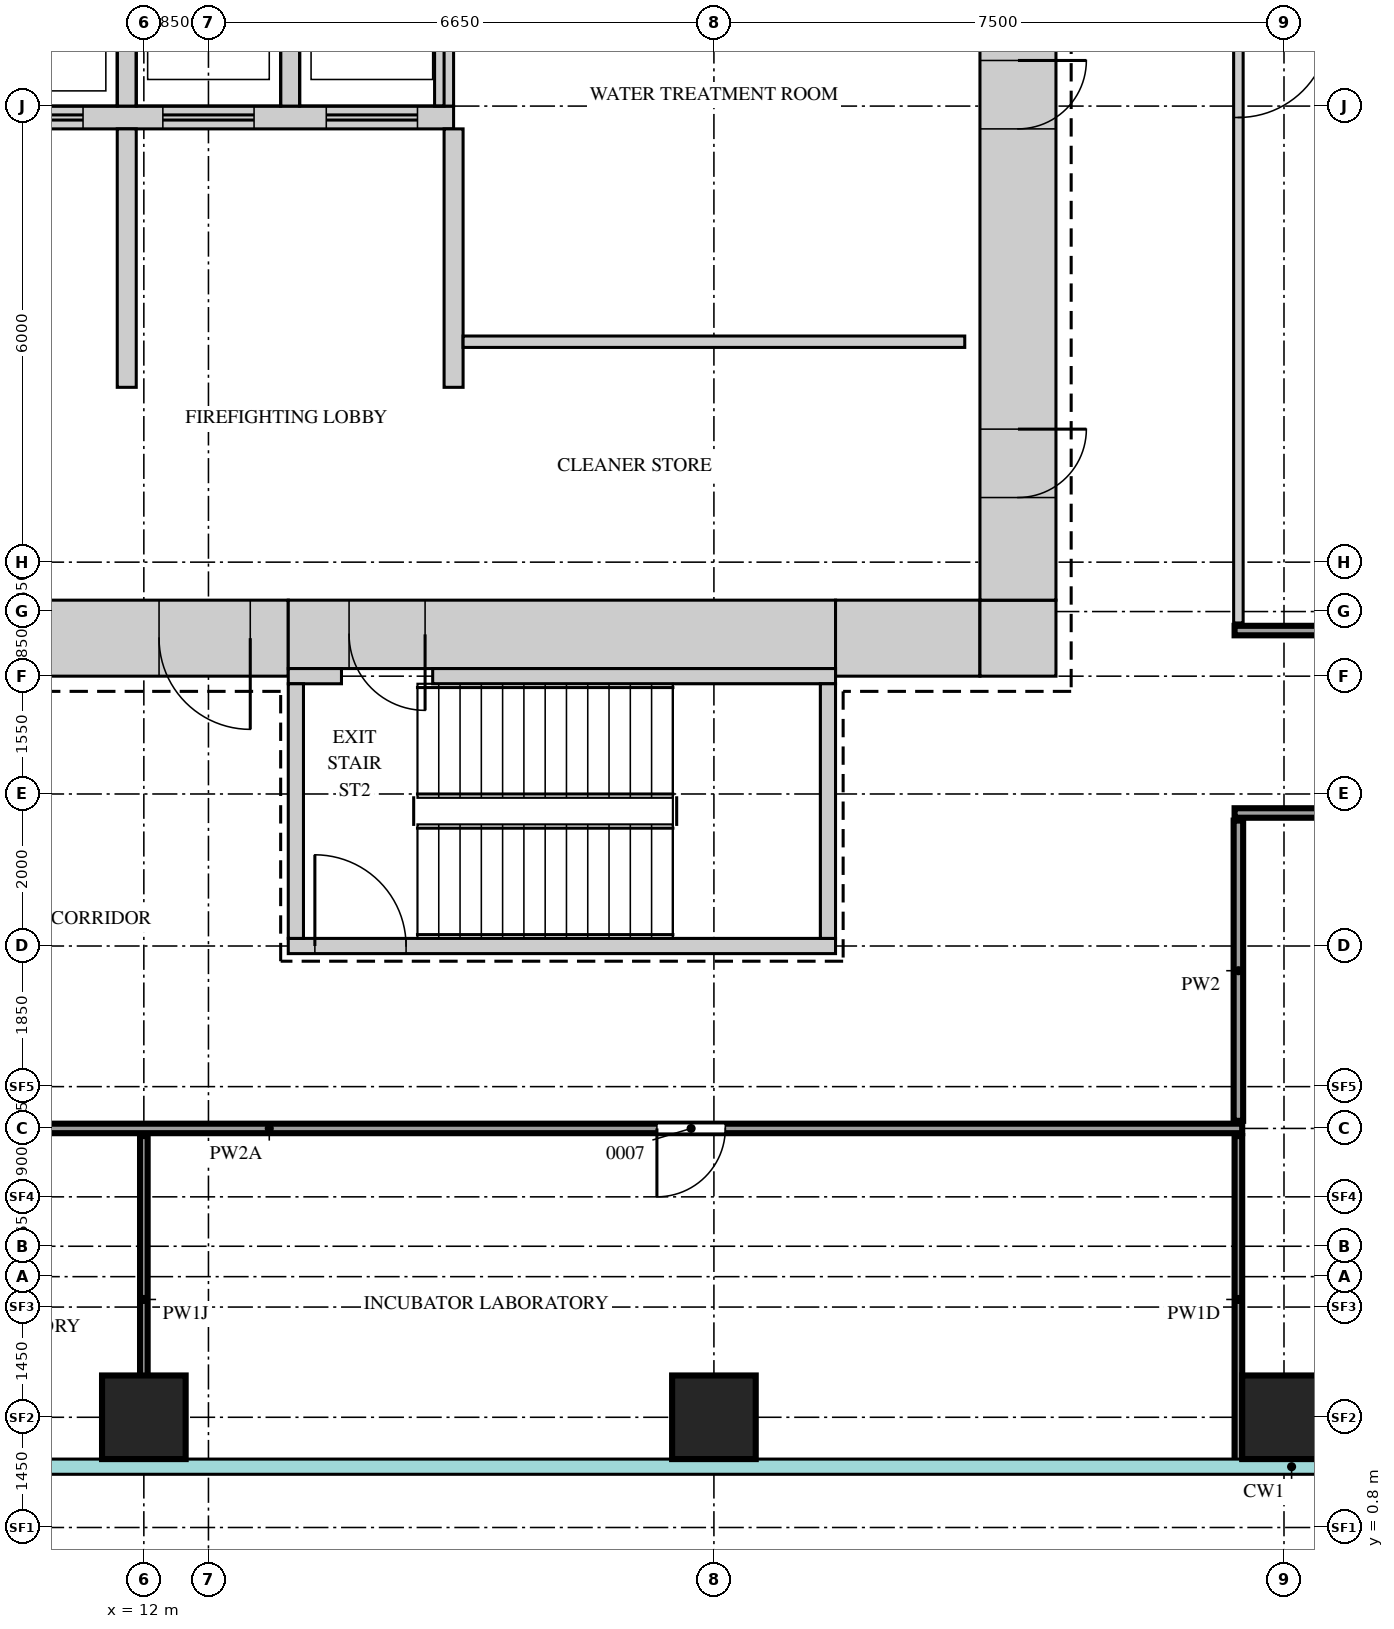
"""IFC4 building model, lengths in metres.
Left out: names, types, materials, properties, quantities, classifications, styles, units other than length and angle.
Written with IfcOpenShell. Run it as: python <this file> out.ifc"""

import sys

from ifc_helpers import new_model, si_unit, direction, frame, frame_2d, origin, origin_2d, place, context, subcontext, project, spatial, rectangle, extrude, source, transform, mapped, element, fill, save


model = new_model("IFC4")
c1 = context("Model", 3, precision=1e-05, world=origin(), true_north=direction((0.0, 1.0)))
c2 = subcontext(c1, "Body", "Model", "MODEL_VIEW")
j1 = project(units=[si_unit("LENGTHUNIT", "METRE"), si_unit("PLANEANGLEUNIT", "RADIAN")], contexts=[c1])
p1 = place(None, origin())
s1 = spatial("IfcSite", under=j1, at=p1, CompositionType="ELEMENT")
p2 = place(p1, origin())
s2 = spatial("IfcBuilding", under=s1, at=p2, CompositionType="ELEMENT")
p3 = place(p2, frame((0.0, 0.0, 149.9)))
s3 = spatial("IfcBuildingStorey", under=s2, at=p3, CompositionType="ELEMENT", Elevation=149.9)
m1 = source(origin(), c2, "Body", "SweptSolid", [
    extrude(rectangle(XDim=6.9, YDim=1.0, at=frame_2d((3.45, 0.0))), origin(), (0.0, 0.0, 1.0), 4.1),
])
p4 = place(p3, frame((7.0, 12.5, 0.0), z_axis=(0.0, 0.0, 1.0), x_axis=(1.0, 0.0, 0.0)))
e1 = element("IfcWall", 1, at=p4, inside=s3, PredefinedType="SHEAR", context=c2, shape_type="MappedRepresentation", body=[
    mapped(m1, transform((0.0, 0.0, 0.0))),
])
m2 = source(origin(), c2, "Body", "SweptSolid", [
    extrude(rectangle(XDim=1.2, YDim=2.1, at=frame_2d((0.6, 1.05))), frame((0.0, 0.51, 0.0), z_axis=(0.0, -1.0, 0.0), x_axis=(1.0, 0.0, 0.0)), (0.0, 0.0, 1.0), 1.02),
])
p5 = place(p4, frame((5.2, 0.0, 0.0)))
e2 = element("IfcOpeningElement", 2, at=p5, cuts=e1, PredefinedType="OPENING", context=c2, shape_type="MappedRepresentation", body=[
    mapped(m2, transform((0.0, 0.0, 0.0))),
])
p6 = place(p4, frame((1.85, 0.0, 0.0)))
e3 = element("IfcOpeningElement", 3, at=p6, cuts=e1, PredefinedType="OPENING", context=c2, shape_type="MappedRepresentation", body=[
    mapped(m2, transform((0.0, 0.0, 0.0))),
])
m3 = source(origin(), c2, "Body", "SweptSolid", [
    extrude(rectangle(XDim=7.2, YDim=0.9, at=frame_2d((3.6, 0.0))), origin(), (0.0, 0.0, 1.0), 4.1),
])
p7 = place(p3, frame((13.9, 12.55, 0.0), z_axis=(0.0, 0.0, 1.0), x_axis=(1.0, 0.0, 0.0)))
e4 = element("IfcWall", 4, at=p7, inside=s3, PredefinedType="SHEAR", context=c2, shape_type="MappedRepresentation", body=[
    mapped(m3, transform((0.0, 0.0, 0.0))),
])
m4 = source(origin(), c2, "Body", "SweptSolid", [
    extrude(rectangle(XDim=1.0, YDim=2.1, at=frame_2d((0.5, 1.05))), frame((0.0, 0.46, 0.0), z_axis=(0.0, -1.0, 0.0), x_axis=(1.0, 0.0, 0.0)), (0.0, 0.0, 1.0), 0.92),
])
p8 = place(p7, frame((0.8, 0.0, 0.0)))
e5 = element("IfcOpeningElement", 5, at=p8, cuts=e4, PredefinedType="OPENING", context=c2, shape_type="MappedRepresentation", body=[
    mapped(m4, transform((0.0, 0.0, 0.0))),
])
m5 = source(origin(), c2, "Body", "SweptSolid", [
    extrude(rectangle(XDim=1.9, YDim=1.0, at=frame_2d((0.95, 0.0))), origin(), (0.0, 0.0, 1.0), 4.1),
])
p9 = place(p3, frame((21.1, 12.5, 0.0), z_axis=(0.0, 0.0, 1.0), x_axis=(1.0, 0.0, 0.0)))
e6 = element("IfcWall", 6, at=p9, inside=s3, PredefinedType="SHEAR", context=c2, shape_type="MappedRepresentation", body=[
    mapped(m5, transform((0.0, 0.0, 0.0))),
])
m6 = source(origin(), c2, "Body", "SweptSolid", [
    extrude(rectangle(XDim=1.0, YDim=1.0, at=frame_2d((0.5, 0.0))), origin(), (0.0, 0.0, 1.0), 4.1),
])
p10 = place(p3, frame((23.0, 12.5, 0.0), z_axis=(0.0, 0.0, 1.0), x_axis=(1.0, 0.0, 0.0)))
e7 = element("IfcWall", 7, at=p10, inside=s3, PredefinedType="SHEAR", context=c2, shape_type="MappedRepresentation", body=[
    mapped(m6, transform((0.0, 0.0, 0.0))),
])
m7 = source(origin(), c2, "Body", "SweptSolid", [
    extrude(rectangle(XDim=28.0, YDim=1.0, at=frame_2d((14.0, 0.0))), origin(), (0.0, 0.0, 1.0), 4.1),
])
p11 = place(p3, frame((23.5, 13.0, 0.0), z_axis=(0.0, 0.0, 1.0), x_axis=(0.0, 1.0, 0.0)))
e8 = element("IfcWall", 8, at=p11, inside=s3, PredefinedType="SHEAR", context=c2, shape_type="MappedRepresentation", body=[
    mapped(m7, transform((0.0, 0.0, 0.0))),
])
m8 = source(origin(), c2, "Body", "SweptSolid", [
    extrude(rectangle(XDim=1.8, YDim=2.1, at=frame_2d((0.9, 1.05))), frame((0.0, 0.51, 0.0), z_axis=(0.0, -1.0, 0.0), x_axis=(1.0, 0.0, 0.0)), (0.0, 0.0, 1.0), 1.02),
])
p12 = place(p11, frame((22.6, 0.0, 0.0)))
e9 = element("IfcOpeningElement", 9, at=p12, cuts=e8, PredefinedType="OPENING", context=c2, shape_type="MappedRepresentation", body=[
    mapped(m8, transform((0.0, 0.0, 0.0))),
])
p13 = place(p11, frame((14.6, 0.0, 0.0)))
e10 = element("IfcOpeningElement", 10, at=p13, cuts=e8, PredefinedType="OPENING", context=c2, shape_type="MappedRepresentation", body=[
    mapped(m2, transform((0.0, 0.0, 0.0))),
])
m9 = source(origin(), c2, "Body", "SweptSolid", [
    extrude(rectangle(XDim=0.9, YDim=2.1, at=frame_2d((0.45, 1.05))), frame((0.0, 0.51, 0.0), z_axis=(0.0, -1.0, 0.0), x_axis=(1.0, 0.0, 0.0)), (0.0, 0.0, 1.0), 1.02),
])
p14 = place(p11, frame((1.35, 0.0, 0.0)))
e11 = element("IfcOpeningElement", 11, at=p14, cuts=e8, PredefinedType="OPENING", context=c2, shape_type="MappedRepresentation", body=[
    mapped(m9, transform((0.0, 0.0, 0.0))),
])
p15 = place(p11, frame((6.2, 0.0, 0.0)))
e12 = element("IfcOpeningElement", 12, at=p15, cuts=e8, PredefinedType="OPENING", context=c2, shape_type="MappedRepresentation", body=[
    mapped(m9, transform((0.0, 0.0, 0.0))),
])
m10 = source(origin(), c2, "Body", "SweptSolid", [
    extrude(rectangle(XDim=0.7, YDim=0.2, at=frame_2d((0.35, 0.0))), origin(), (0.0, 0.0, 1.0), 4.1),
])
p16 = place(p3, frame((13.9, 12.0, 0.0), z_axis=(0.0, 0.0, 1.0), x_axis=(1.0, 0.0, 0.0)))
e13 = element("IfcWall", 13, at=p16, inside=s3, PredefinedType="SHEAR", context=c2, shape_type="MappedRepresentation", body=[
    mapped(m10, transform((0.0, 0.0, 0.0))),
])
m11 = source(origin(), c2, "Body", "SweptSolid", [
    extrude(rectangle(XDim=5.3, YDim=0.2, at=frame_2d((2.65, 0.0))), origin(), (0.0, 0.0, 1.0), 4.1),
])
p17 = place(p3, frame((15.8, 12.0, 0.0), z_axis=(0.0, 0.0, 1.0), x_axis=(1.0, 0.0, 0.0)))
e14 = element("IfcWall", 14, at=p17, inside=s3, PredefinedType="SHEAR", context=c2, shape_type="MappedRepresentation", body=[
    mapped(m11, transform((0.0, 0.0, 0.0))),
])
m12 = source(origin(), c2, "Body", "SweptSolid", [
    extrude(rectangle(XDim=7.2, YDim=0.2, at=frame_2d((3.6, 0.0))), origin(), (0.0, 0.0, 1.0), 4.1),
])
p18 = place(p3, frame((13.9, 8.45, 0.0), z_axis=(0.0, 0.0, 1.0), x_axis=(1.0, 0.0, 0.0)))
e15 = element("IfcWall", 15, at=p18, inside=s3, PredefinedType="SHEAR", context=c2, shape_type="MappedRepresentation", body=[
    mapped(m12, transform((0.0, 0.0, 0.0))),
])
m13 = source(origin(), c2, "Body", "SweptSolid", [
    extrude(rectangle(XDim=1.2, YDim=2.1, at=frame_2d((0.6, 1.05))), frame((0.0, 0.11, 0.0), z_axis=(0.0, -1.0, 0.0), x_axis=(1.0, 0.0, 0.0)), (0.0, 0.0, 1.0), 0.22),
])
p19 = place(p18, frame((0.35, 0.0, 0.0)))
e16 = element("IfcOpeningElement", 16, at=p19, cuts=e15, PredefinedType="OPENING", context=c2, shape_type="MappedRepresentation", body=[
    mapped(m13, transform((0.0, 0.0, 0.0))),
])
m14 = source(origin(), c2, "Body", "SweptSolid", [
    extrude(rectangle(XDim=3.35, YDim=0.2, at=frame_2d((1.675, 0.0))), origin(), (0.0, 0.0, 1.0), 4.1),
])
for number, where, z_axis, x_axis in (
    (17, (21.0, 8.55, 0.0), (0.0, 0.0, 1.0), (0.0, 1.0, 0.0)),
    (18, (14.0, 8.55, 0.0), (0.0, 0.0, 1.0), (0.0, 1.0, 0.0)),
):
    element("IfcWall", number, at=place(p3, frame(where, z_axis=z_axis, x_axis=x_axis)), inside=s3, PredefinedType="SHEAR", context=c2, shape_type="MappedRepresentation", body=[
        mapped(m14, transform((0.0, 0.0, 0.0))),
    ])
m15 = source(origin(), c2, "Body", "SweptSolid", [
    extrude(rectangle(XDim=9.075, YDim=0.3, at=frame_2d((4.538, 0.0))), origin(), (0.0, 0.0, 1.0), 4.1),
])
p20 = place(p3, frame((7.0, 19.35, 0.0), z_axis=(0.0, 0.0, 1.0), x_axis=(1.0, 0.0, 0.0)))
e19 = element("IfcWall", 19, at=p20, inside=s3, PredefinedType="STANDARD", context=c2, shape_type="MappedRepresentation", body=[
    mapped(m15, transform((0.0, 0.0, 0.0))),
])
m16 = source(origin(), c2, "Body", "SweptSolid", [
    extrude(rectangle(XDim=1.2, YDim=2.1, at=frame_2d((0.6, 1.05))), frame((0.0, 0.16, 0.0), z_axis=(0.0, -1.0, 0.0), x_axis=(1.0, 0.0, 0.0)), (0.0, 0.0, 1.0), 0.32),
])
p21 = place(p20, frame((0.65, 0.0, 0.0)))
e20 = element("IfcOpeningElement", 20, at=p21, cuts=e19, PredefinedType="OPENING", context=c2, shape_type="MappedRepresentation", body=[
    mapped(m16, transform((0.0, 0.0, 0.0))),
])
p22 = place(p20, frame((3.0, 0.0, 0.0)))
e21 = element("IfcOpeningElement", 21, at=p22, cuts=e19, PredefinedType="OPENING", context=c2, shape_type="MappedRepresentation", body=[
    mapped(m16, transform((0.0, 0.0, 0.0))),
])
p23 = place(p20, frame((5.25, 0.0, 0.0)))
e22 = element("IfcOpeningElement", 22, at=p23, cuts=e19, PredefinedType="OPENING", context=c2, shape_type="MappedRepresentation", body=[
    mapped(m16, transform((0.0, 0.0, 0.0))),
])
p24 = place(p20, frame((7.4, 0.0, 0.0)))
e23 = element("IfcOpeningElement", 23, at=p24, cuts=e19, PredefinedType="OPENING", context=c2, shape_type="MappedRepresentation", body=[
    mapped(m16, transform((0.0, 0.0, 0.0))),
])
m17 = source(origin(), c2, "Body", "SweptSolid", [
    extrude(rectangle(XDim=3.1, YDim=0.25, at=frame_2d((1.55, 0.0))), origin(), (0.0, 0.0, 1.0), 4.1),
])
for number, where, z_axis, x_axis in (
    (24, (11.775, 19.5, 0.0), (0.0, 0.0, 1.0), (0.0, 1.0, 0.0)),
    (25, (13.925, 19.5, 0.0), (0.0, 0.0, 1.0), (0.0, 1.0, 0.0)),
    (26, (15.95, 19.5, 0.0), (0.0, 0.0, 1.0), (0.0, 1.0, 0.0)),
):
    element("IfcWall", number, at=place(p3, frame(where, z_axis=z_axis, x_axis=x_axis)), inside=s3, PredefinedType="STANDARD", context=c2, shape_type="MappedRepresentation", body=[
        mapped(m17, transform((0.0, 0.0, 0.0))),
    ])
m18 = source(origin(), c2, "Body", "SweptSolid", [
    extrude(rectangle(XDim=3.4, YDim=0.25, at=frame_2d((1.7, 0.0))), origin(), (0.0, 0.0, 1.0), 4.1),
])
for number, where, z_axis, x_axis in (
    (27, (16.075, 15.8, 0.0), (0.0, 0.0, 1.0), (0.0, 1.0, 0.0)),
    (28, (11.775, 15.8, 0.0), (0.0, 0.0, 1.0), (0.0, 1.0, 0.0)),
):
    element("IfcWall", number, at=place(p3, frame(where, z_axis=z_axis, x_axis=x_axis)), inside=s3, PredefinedType="STANDARD", context=c2, shape_type="MappedRepresentation", body=[
        mapped(m18, transform((0.0, 0.0, 0.0))),
    ])
m19 = source(origin(), c2, "Body", "SweptSolid", [
    extrude(rectangle(XDim=1.1, YDim=1.1, at=origin_2d()), origin(), (0.0, 0.0, 1.0), 4.1),
])
for number, where, z_axis, x_axis in (
    (29, (12.0, 2.25, 0.0), (0.0, 0.0, 1.0), (1.0, 0.0, 0.0)),
    (30, (19.5, 2.25, 0.0), (0.0, 0.0, 1.0), (1.0, 0.0, 0.0)),
    (31, (27.0, 2.25, 0.0), (0.0, 0.0, 1.0), (1.0, 0.0, 0.0)),
):
    element("IfcColumn", number, at=place(p3, frame(where, z_axis=z_axis, x_axis=x_axis)), inside=s3, PredefinedType="COLUMN", context=c2, shape_type="MappedRepresentation", body=[
        mapped(m19, transform((0.0, 0.0, 0.0))),
    ])
m20 = source(origin(), c2, "Body", "SweptSolid", [
    extrude(rectangle(XDim=4.3, YDim=0.1, at=frame_2d((2.15, 0.0))), origin(), (0.0, 0.0, 1.0), 3.65),
])
p25 = place(p3, frame((12.0, 1.65, 0.0), z_axis=(0.0, 0.0, 1.0), x_axis=(0.0, 1.0, 0.0)))
e32 = element("IfcWall", 32, at=p25, inside=s3, PredefinedType="PARTITIONING", context=c2, shape_type="MappedRepresentation", body=[
    mapped(m20, transform((0.0, 0.0, 0.0))),
])
m21 = source(origin(), c2, "Body", "SweptSolid", [
    extrude(rectangle(XDim=4.3, YDim=0.1, at=frame_2d((2.15, 0.0))), origin(), (0.0, 0.0, 1.0), 4.2),
])
p26 = place(p3, frame((26.4, 1.65, 0.0), z_axis=(0.0, 0.0, 1.0), x_axis=(0.0, 1.0, 0.0)))
e33 = element("IfcWall", 33, at=p26, inside=s3, PredefinedType="PARTITIONING", context=c2, shape_type="MappedRepresentation", body=[
    mapped(m21, transform((0.0, 0.0, 0.0))),
])
m22 = source(origin(), c2, "Body", "SweptSolid", [
    extrude(rectangle(XDim=22.3, YDim=0.125, at=frame_2d((11.15, 0.0))), origin(), (0.0, 0.0, 1.0), 3.55),
])
p27 = place(p3, frame((4.15, 6.05, 0.0), z_axis=(0.0, 0.0, 1.0), x_axis=(1.0, 0.0, 0.0)))
e34 = element("IfcWall", 34, at=p27, inside=s3, PredefinedType="PARTITIONING", context=c2, shape_type="MappedRepresentation", body=[
    mapped(m22, transform((0.0, 0.0, 0.0))),
])
m23 = source(origin(), c2, "Body", "SweptSolid", [
    extrude(rectangle(XDim=0.9, YDim=2.1, at=frame_2d((0.45, 1.05))), frame((0.0, 0.073, 0.0), z_axis=(0.0, -1.0, 0.0), x_axis=(1.0, 0.0, 0.0)), (0.0, 0.0, 1.0), 0.145),
])
p28 = place(p27, frame((3.5, 0.0, 0.0)))
e35 = element("IfcOpeningElement", 35, at=p28, cuts=e34, PredefinedType="OPENING", context=c2, shape_type="MappedRepresentation", body=[
    mapped(m23, transform((0.0, 0.0, 0.0))),
])
p29 = place(p27, frame((14.6, 0.0, 0.0)))
e36 = element("IfcOpeningElement", 36, at=p29, cuts=e34, PredefinedType="OPENING", context=c2, shape_type="MappedRepresentation", body=[
    mapped(m23, transform((0.0, 0.0, 0.0))),
])
m24 = source(origin(), c2, "Body", "SweptSolid", [
    extrude(rectangle(XDim=3.95, YDim=0.125, at=frame_2d((1.975, 0.0))), origin(), (0.0, 0.0, 1.0), 4.2),
])
p30 = place(p3, frame((26.4, 6.15, 0.0), z_axis=(0.0, 0.0, 1.0), x_axis=(0.0, 1.0, 0.0)))
e37 = element("IfcWall", 37, at=p30, inside=s3, PredefinedType="PARTITIONING", context=c2, shape_type="MappedRepresentation", body=[
    mapped(m24, transform((0.0, 0.0, 0.0))),
])
m25 = source(origin(), c2, "Body", "SweptSolid", [
    extrude(rectangle(XDim=20.0, YDim=0.125, at=frame_2d((10.0, 0.0))), origin(), (0.0, 0.0, 1.0), 4.2),
])
p31 = place(p3, frame((26.35, 10.2, 0.0), z_axis=(0.0, 0.0, 1.0), x_axis=(1.0, 0.0, 0.0)))
e38 = element("IfcWall", 38, at=p31, inside=s3, PredefinedType="PARTITIONING", context=c2, shape_type="MappedRepresentation", body=[
    mapped(m25, transform((0.0, 0.0, 0.0))),
])
m26 = source(origin(), c2, "Body", "SweptSolid", [
    extrude(rectangle(XDim=1.2, YDim=2.1, at=frame_2d((0.6, 1.05))), frame((0.0, 0.073, 0.0), z_axis=(0.0, -1.0, 0.0), x_axis=(1.0, 0.0, 0.0)), (0.0, 0.0, 1.0), 0.145),
])
p32 = place(p31, frame((8.25, 0.0, 0.0)))
e39 = element("IfcOpeningElement", 39, at=p32, cuts=e38, PredefinedType="OPENING", context=c2, shape_type="MappedRepresentation", body=[
    mapped(m26, transform((0.0, 0.0, 0.0))),
])
m27 = source(origin(), c2, "Body", "SweptSolid", [
    extrude(rectangle(XDim=17.7, YDim=0.125, at=frame_2d((8.85, 0.0))), origin(), (0.0, 0.0, 1.0), 4.2),
])
p33 = place(p3, frame((26.35, 12.6, 0.0), z_axis=(0.0, 0.0, 1.0), x_axis=(1.0, 0.0, 0.0)))
e40 = element("IfcWall", 40, at=p33, inside=s3, PredefinedType="PARTITIONING", context=c2, shape_type="MappedRepresentation", body=[
    mapped(m27, transform((0.0, 0.0, 0.0))),
])
m28 = source(origin(), c2, "Body", "SweptSolid", [
    extrude(rectangle(XDim=23.2, YDim=0.125, at=frame_2d((11.6, 0.0))), origin(), (0.0, 0.0, 1.0), 4.2),
])
p34 = place(p3, frame((26.4, 12.7, 0.0), z_axis=(0.0, 0.0, 1.0), x_axis=(0.0, 1.0, 0.0)))
e41 = element("IfcWall", 41, at=p34, inside=s3, PredefinedType="PARTITIONING", context=c2, shape_type="MappedRepresentation", body=[
    mapped(m28, transform((0.0, 0.0, 0.0))),
])
p35 = place(p34, frame((6.65, 0.0, 0.0)))
e42 = element("IfcOpeningElement", 42, at=p35, cuts=e41, PredefinedType="OPENING", context=c2, shape_type="MappedRepresentation", body=[
    mapped(m26, transform((0.0, 0.0, 0.0))),
])
m29 = source(origin(), c2, "Body", "SweptSolid", [
    extrude(rectangle(XDim=6.6, YDim=0.15, at=frame_2d((3.3, 0.0))), origin(), (0.0, 0.0, 1.0), 4.2),
])
p36 = place(p3, frame((16.2, 16.4, 0.0), z_axis=(0.0, 0.0, 1.0), x_axis=(1.0, 0.0, 0.0)))
e43 = element("IfcWall", 43, at=p36, inside=s3, PredefinedType="PARTITIONING", context=c2, shape_type="MappedRepresentation", body=[
    mapped(m29, transform((0.0, 0.0, 0.0))),
])
m30 = source(origin(), c2, "Body", "SweptSolid", [
    extrude(rectangle(XDim=0.9, YDim=2.1, at=frame_2d((0.45, 1.05))), frame((0.0, 0.45, 0.0), z_axis=(0.0, -1.0, 0.0), x_axis=(1.0, 0.0, 0.0)), (0.0, 0.0, 1.0), 0.9),
])
p37 = place(p14, origin())
e44 = element("IfcDoor", 44, at=p37, inside=s3, OperationType="SINGLE_SWING_RIGHT", PredefinedType="DOOR", context=c2, shape_type="MappedRepresentation", body=[
    mapped(m30, transform((0.0, 0.0, 0.0))),
])
fill(e11, e44)
p38 = place(p15, origin())
e45 = element("IfcDoor", 45, at=p38, inside=s3, OperationType="SINGLE_SWING_RIGHT", PredefinedType="DOOR", context=c2, shape_type="MappedRepresentation", body=[
    mapped(m30, transform((0.0, 0.0, 0.0))),
])
fill(e12, e45)
m31 = source(origin(), c2, "Body", "SweptSolid", [
    extrude(rectangle(XDim=1.2, YDim=2.1, at=frame_2d((0.6, 1.05))), frame((0.0, 0.45, 0.0), z_axis=(0.0, -1.0, 0.0), x_axis=(1.0, 0.0, 0.0)), (0.0, 0.0, 1.0), 0.9),
])
p39 = place(p5, origin())
e46 = element("IfcDoor", 46, at=p39, inside=s3, OperationType="SINGLE_SWING_RIGHT", PredefinedType="DOOR", context=c2, shape_type="MappedRepresentation", body=[
    mapped(m31, transform((0.0, 0.0, 0.0))),
])
fill(e2, e46)
m32 = source(origin(), c2, "Body", "SweptSolid", [
    extrude(rectangle(XDim=1.0, YDim=2.1, at=frame_2d((0.5, 1.05))), frame((0.0, 0.4, 0.0), z_axis=(0.0, -1.0, 0.0), x_axis=(1.0, 0.0, 0.0)), (0.0, 0.0, 1.0), 0.8),
])
p40 = place(p8, origin())
e47 = element("IfcDoor", 47, at=p40, inside=s3, OperationType="SINGLE_SWING_RIGHT", PredefinedType="DOOR", context=c2, shape_type="MappedRepresentation", body=[
    mapped(m32, transform((0.0, 0.0, 0.0))),
])
fill(e5, e47)
m33 = source(origin(), c2, "Body", "SweptSolid", [
    extrude(rectangle(XDim=0.9, YDim=2.1, at=frame_2d((0.45, 1.05))), frame((0.0, 0.025, 0.0), z_axis=(0.0, -1.0, 0.0), x_axis=(1.0, 0.0, 0.0)), (0.0, 0.0, 1.0), 0.05),
])
p41 = place(p29, origin())
e48 = element("IfcDoor", 48, at=p41, inside=s3, OperationType="SINGLE_SWING_LEFT", PredefinedType="DOOR", context=c2, shape_type="MappedRepresentation", body=[
    mapped(m33, transform((0.0, 0.0, 0.0))),
])
fill(e36, e48)
m34 = source(origin(), c2, "Body", "SweptSolid", [
    extrude(rectangle(XDim=1.2, YDim=2.1, at=frame_2d((0.6, 1.05))), frame((0.0, 0.025, 0.0), z_axis=(0.0, -1.0, 0.0), x_axis=(1.0, 0.0, 0.0)), (0.0, 0.0, 1.0), 0.05),
])
p42 = place(p35, origin())
e49 = element("IfcDoor", 49, at=p42, inside=s3, OperationType="SINGLE_SWING_RIGHT", PredefinedType="DOOR", context=c2, shape_type="MappedRepresentation", body=[
    mapped(m34, transform((0.0, 0.0, 0.0))),
])
fill(e42, e49)
p43 = place(p19, origin())
e50 = element("IfcDoor", 50, at=p43, inside=s3, OperationType="SINGLE_SWING_RIGHT", PredefinedType="DOOR", context=c2, shape_type="MappedRepresentation", body=[
    mapped(m34, transform((0.0, 0.0, 0.0))),
])
fill(e16, e50)
p44 = place(p22, origin())
e51 = element("IfcDoor", 51, at=p44, inside=s3, OperationType="DOUBLE_DOOR_SLIDING", PredefinedType="DOOR", context=c2, shape_type="MappedRepresentation", body=[
    mapped(m34, transform((0.0, 0.0, 0.0))),
])
fill(e21, e51)
p45 = place(p23, origin())
e52 = element("IfcDoor", 52, at=p45, inside=s3, OperationType="DOUBLE_DOOR_SLIDING", PredefinedType="DOOR", context=c2, shape_type="MappedRepresentation", body=[
    mapped(m34, transform((0.0, 0.0, 0.0))),
])
fill(e22, e52)
p46 = place(p24, origin())
e53 = element("IfcDoor", 53, at=p46, inside=s3, OperationType="DOUBLE_DOOR_SLIDING", PredefinedType="DOOR", context=c2, shape_type="MappedRepresentation", body=[
    mapped(m34, transform((0.0, 0.0, 0.0))),
])
fill(e23, e53)
save(model, sys.argv[1])
